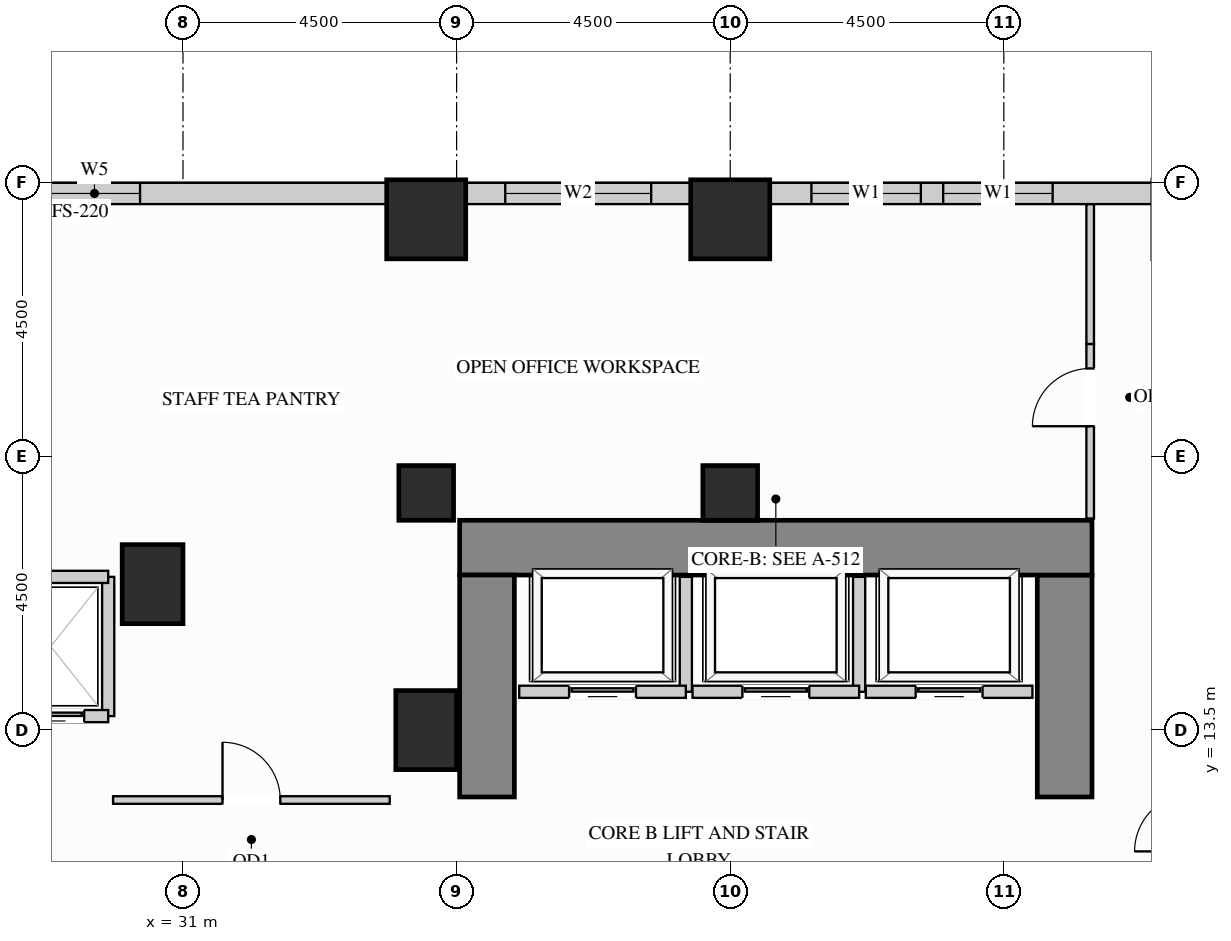
"""IFC4 building model, lengths in metres.
Left out: names, types, materials, properties, quantities, classifications, styles, units other than length and angle.
Written with IfcOpenShell. Run it as: python <this file> out.ifc"""

import sys

from ifc_helpers import new_model, si_unit, direction, frame, frame_2d, origin, origin_2d, place, context, subcontext, project, spatial, rectangle, extrude, source, transform, mapped, element, fill, save


model = new_model("IFC4")
c1 = context("Model", 3, precision=1e-05, world=origin(), true_north=direction((0.0, 1.0)))
c2 = subcontext(c1, "Body", "Model", "MODEL_VIEW")
j1 = project(units=[si_unit("LENGTHUNIT", "METRE"), si_unit("PLANEANGLEUNIT", "RADIAN")], contexts=[c1])
p1 = place(None, origin())
s1 = spatial("IfcSite", under=j1, at=p1, CompositionType="ELEMENT")
p2 = place(p1, origin())
s2 = spatial("IfcBuilding", under=s1, at=p2, CompositionType="ELEMENT")
p3 = place(p2, frame((0.0, 0.0, 22.5)))
s3 = spatial("IfcBuildingStorey", under=s2, at=p3, CompositionType="ELEMENT", Elevation=22.5)
m1 = source(origin(), c2, "Body", "SweptSolid", [
    extrude(rectangle(XDim=0.9, YDim=0.9, at=origin_2d()), origin(), (0.0, 0.0, 1.0), 3.38),
])
for number, where, z_axis, x_axis in (
    (1, (35.0, 17.4, 0.0), (0.0, 0.0, 1.0), (1.0, 0.0, 0.0)),
    (2, (40.0, 17.4, 0.0), (0.0, 0.0, 1.0), (1.0, 0.0, 0.0)),
):
    element("IfcColumn", number, at=place(p3, frame(where, z_axis=z_axis, x_axis=x_axis)), inside=s3, PredefinedType="COLUMN", context=c2, shape_type="MappedRepresentation", body=[
        mapped(m1, transform((0.0, 0.0, 0.0), x_axis=(1.0, 0.0, 0.0), y_axis=(0.0, 1.0, 0.0), z_axis=(0.0, 0.0, 1.0))),
    ])
m2 = source(origin(), c2, "Body", "SweptSolid", [
    extrude(rectangle(XDim=1.0, YDim=1.3, at=origin_2d()), origin(), (0.0, 0.0, 1.0), 3.38),
])
for number, where, z_axis, x_axis in (
    (3, (35.0, 13.5, 0.0), (0.0, 0.0, 1.0), (1.0, 0.0, 0.0)),
    (4, (30.5, 15.9, 0.0), (0.0, 0.0, 1.0), (1.0, 0.0, 0.0)),
):
    element("IfcColumn", number, at=place(p3, frame(where, z_axis=z_axis, x_axis=x_axis)), inside=s3, PredefinedType="COLUMN", context=c2, shape_type="MappedRepresentation", body=[
        mapped(m2, transform((0.0, 0.0, 0.0), x_axis=(1.0, 0.0, 0.0), y_axis=(0.0, 1.0, 0.0), z_axis=(0.0, 0.0, 1.0))),
    ])
m3 = source(origin(), c2, "Body", "SweptSolid", [
    extrude(rectangle(XDim=1.3, YDim=1.3, at=origin_2d()), origin(), (0.0, 0.0, 1.0), 3.38),
])
for number, where, z_axis, x_axis in (
    (5, (35.0, 21.9, 0.0), (0.0, 0.0, 1.0), (1.0, 0.0, 0.0)),
    (6, (40.0, 21.9, 0.0), (0.0, 0.0, 1.0), (1.0, 0.0, 0.0)),
):
    element("IfcColumn", number, at=place(p3, frame(where, z_axis=z_axis, x_axis=x_axis)), inside=s3, PredefinedType="COLUMN", context=c2, shape_type="MappedRepresentation", body=[
        mapped(m3, transform((0.0, 0.0, 0.0), x_axis=(1.0, 0.0, 0.0), y_axis=(0.0, 1.0, 0.0), z_axis=(0.0, 0.0, 1.0))),
    ])
m4 = source(origin(), c2, "Body", "SweptSolid", [
    extrude(rectangle(XDim=3.65, YDim=0.9, at=frame_2d((1.825, 0.0))), origin(), (0.0, 0.0, 1.0), 3.38),
])
p4 = place(p3, frame((45.5, 12.4, 0.0), z_axis=(0.0, 0.0, 1.0), x_axis=(0.0, 1.0, 0.0)))
e7 = element("IfcWall", 7, at=p4, inside=s3, PredefinedType="SHEAR", context=c2, shape_type="MappedRepresentation", body=[
    mapped(m4, transform((0.0, 0.0, 0.0), x_axis=(1.0, 0.0, 0.0), y_axis=(0.0, 1.0, 0.0), z_axis=(0.0, 0.0, 1.0))),
])
m5 = source(origin(), c2, "Body", "SweptSolid", [
    extrude(rectangle(XDim=10.4, YDim=0.9, at=frame_2d((5.2, 0.0))), origin(), (0.0, 0.0, 1.0), 3.38),
])
p5 = place(p3, frame((35.55, 16.5, 0.0), z_axis=(0.0, 0.0, 1.0), x_axis=(1.0, 0.0, 0.0)))
e8 = element("IfcWall", 8, at=p5, inside=s3, PredefinedType="SHEAR", context=c2, shape_type="MappedRepresentation", body=[
    mapped(m5, transform((0.0, 0.0, 0.0), x_axis=(1.0, 0.0, 0.0), y_axis=(0.0, 1.0, 0.0), z_axis=(0.0, 0.0, 1.0))),
])
p6 = place(p3, frame((36.0, 12.4, 0.0), z_axis=(0.0, 0.0, 1.0), x_axis=(0.0, 1.0, 0.0)))
e9 = element("IfcWall", 9, at=p6, inside=s3, PredefinedType="SHEAR", context=c2, shape_type="MappedRepresentation", body=[
    mapped(m4, transform((0.0, 0.0, 0.0), x_axis=(1.0, 0.0, 0.0), y_axis=(0.0, 1.0, 0.0), z_axis=(0.0, 0.0, 1.0))),
])
p7 = place(p3, frame((46.952, 22.325, 0.0), z_axis=(0.0, 0.0, 1.0), x_axis=(-1.0, 0.0, 0.0)))
e10 = element("IfcWall", 10, at=p7, inside=s3, PredefinedType="SOLIDWALL", context=c2, shape_type="SweptSolid", body=[
    extrude(rectangle(XDim=6.304, YDim=0.35, at=frame_2d((3.152, 0.0))), origin(), (0.0, 0.0, 1.0), 2.51),
])
p8 = place(p7, frame((1.649, 0.0, 0.78)))
e11 = element("IfcOpeningElement", 11, at=p8, cuts=e10, PredefinedType="OPENING", context=c2, shape_type="SweptSolid", body=[
    extrude(rectangle(XDim=1.8, YDim=1.55, at=frame_2d((0.9, 0.775))), frame((0.0, 0.185, 0.0), z_axis=(0.0, -1.0, 0.0), x_axis=(1.0, 0.0, 0.0)), (0.0, 0.0, 1.0), 0.37),
])
p9 = place(p7, frame((3.817, 0.0, 0.78)))
e12 = element("IfcOpeningElement", 12, at=p9, cuts=e10, PredefinedType="OPENING", context=c2, shape_type="SweptSolid", body=[
    extrude(rectangle(XDim=1.8, YDim=1.55, at=frame_2d((0.9, 0.775))), frame((0.0, 0.185, 0.0), z_axis=(0.0, -1.0, 0.0), x_axis=(1.0, 0.0, 0.0)), (0.0, 0.0, 1.0), 0.37),
])
p10 = place(p3, frame((39.352, 22.325, 0.0), z_axis=(0.0, 0.0, 1.0), x_axis=(-1.0, 0.0, 0.0)))
e13 = element("IfcWall", 13, at=p10, inside=s3, PredefinedType="SOLIDWALL", context=c2, shape_type="SweptSolid", body=[
    extrude(rectangle(XDim=3.704, YDim=0.35, at=frame_2d((1.852, 0.0))), origin(), (0.0, 0.0, 1.0), 2.51),
])
p11 = place(p10, frame((0.652, 0.0, 0.78)))
e14 = element("IfcOpeningElement", 14, at=p11, cuts=e13, PredefinedType="OPENING", context=c2, shape_type="SweptSolid", body=[
    extrude(rectangle(XDim=2.4, YDim=1.55, at=frame_2d((1.2, 0.775))), frame((0.0, 0.185, 0.0), z_axis=(0.0, -1.0, 0.0), x_axis=(1.0, 0.0, 0.0)), (0.0, 0.0, 1.0), 0.37),
])
p12 = place(p3, frame((34.352, 22.325, 0.0), z_axis=(0.0, 0.0, 1.0), x_axis=(-1.0, 0.0, 0.0)))
e15 = element("IfcWall", 15, at=p12, inside=s3, PredefinedType="SOLIDWALL", context=c2, shape_type="SweptSolid", body=[
    extrude(rectangle(XDim=14.854, YDim=0.35, at=frame_2d((7.427, 0.0))), origin(), (0.0, 0.0, 1.0), 3.365),
])
p13 = place(p12, frame((4.058, 0.0, 0.78)))
e16 = element("IfcOpeningElement", 16, at=p13, cuts=e15, PredefinedType="OPENING", context=c2, shape_type="SweptSolid", body=[
    extrude(rectangle(XDim=1.5, YDim=2.0, at=frame_2d((0.75, 1.0))), frame((0.0, 0.185, 0.0), z_axis=(0.0, -1.0, 0.0), x_axis=(1.0, 0.0, 0.0)), (0.0, 0.0, 1.0), 0.37),
])
p14 = place(p12, frame((9.296, 0.0, 0.78)))
e17 = element("IfcOpeningElement", 17, at=p14, cuts=e15, PredefinedType="OPENING", context=c2, shape_type="SweptSolid", body=[
    extrude(rectangle(XDim=1.5, YDim=2.0, at=frame_2d((0.75, 1.0))), frame((0.0, 0.185, 0.0), z_axis=(0.0, -1.0, 0.0), x_axis=(1.0, 0.0, 0.0)), (0.0, 0.0, 1.0), 0.37),
])
p15 = place(p3, frame((45.92, 16.98, 0.0), z_axis=(0.0, 0.0, 1.0), x_axis=(0.0, 1.0, 0.0)))
e18 = element("IfcWall", 18, at=p15, inside=s3, PredefinedType="PARTITIONING", context=c2, shape_type="SweptSolid", body=[
    extrude(rectangle(XDim=2.87, YDim=0.125, at=frame_2d((1.435, 0.0))), origin(), (0.0, 0.0, 1.0), 3.365),
])
p16 = place(p15, frame((1.517, 0.0, 0.0)))
e19 = element("IfcOpeningElement", 19, at=p16, cuts=e18, PredefinedType="OPENING", context=c2, shape_type="SweptSolid", body=[
    extrude(rectangle(XDim=0.95, YDim=2.15, at=frame_2d((0.475, 1.075))), frame((0.0, 0.073, 0.0), z_axis=(0.0, -1.0, 0.0), x_axis=(1.0, 0.0, 0.0)), (0.0, 0.0, 1.0), 0.145),
])
m6 = source(origin(), c2, "Body", "SweptSolid", [
    extrude(rectangle(XDim=2.298, YDim=0.125, at=frame_2d((1.149, 0.0))), origin(), (0.0, 0.0, 1.0), 3.365),
])
p17 = place(p3, frame((45.92, 19.85, 0.0), z_axis=(0.0, 0.0, 1.0), x_axis=(0.0, 1.0, 0.0)))
e20 = element("IfcWall", 20, at=p17, inside=s3, PredefinedType="PARTITIONING", context=c2, shape_type="MappedRepresentation", body=[
    mapped(m6, transform((0.0, 0.0, 0.0), x_axis=(1.0, 0.0, 0.0), y_axis=(0.0, 1.0, 0.0), z_axis=(0.0, 0.0, 1.0))),
])
p18 = place(p3, frame((29.85, 12.35, 0.0), z_axis=(0.0, 0.0, 1.0), x_axis=(1.0, 0.0, 0.0)))
e21 = element("IfcWall", 21, at=p18, inside=s3, PredefinedType="PARTITIONING", context=c2, shape_type="SweptSolid", body=[
    extrude(rectangle(XDim=4.55, YDim=0.125, at=frame_2d((2.275, 0.0))), origin(), (0.0, 0.0, 1.0), 3.365),
])
p19 = place(p18, frame((1.8, 0.0, 0.0)))
e22 = element("IfcOpeningElement", 22, at=p19, cuts=e21, PredefinedType="OPENING", context=c2, shape_type="SweptSolid", body=[
    extrude(rectangle(XDim=0.95, YDim=2.15, at=frame_2d((0.475, 1.075))), frame((0.0, 0.073, 0.0), z_axis=(0.0, -1.0, 0.0), x_axis=(1.0, 0.0, 0.0)), (0.0, 0.0, 1.0), 0.145),
])
m7 = source(origin(), c2, "Body", "SweptSolid", [
    extrude(rectangle(XDim=1.89, YDim=0.2, at=frame_2d((0.945, 0.0))), origin(), (0.0, 0.0, 1.0), 3.365),
])
p20 = place(p3, frame((39.27, 14.13, 0.0), z_axis=(0.0, 0.0, 1.0), x_axis=(0.0, 1.0, 0.0)))
e23 = element("IfcWall", 23, at=p20, inside=s3, PredefinedType="PARTITIONING", context=c2, shape_type="MappedRepresentation", body=[
    mapped(m7, transform((0.0, 0.0, 0.0), x_axis=(1.0, 0.0, 0.0), y_axis=(0.0, 1.0, 0.0), z_axis=(0.0, 0.0, 1.0))),
])
p21 = place(p3, frame((36.53, 14.13, 0.0), z_axis=(0.0, 0.0, 1.0), x_axis=(1.0, 0.0, 0.0)))
e24 = element("IfcWall", 24, at=p21, inside=s3, PredefinedType="PARTITIONING", context=c2, shape_type="SweptSolid", body=[
    extrude(rectangle(XDim=2.74, YDim=0.2, at=frame_2d((1.37, 0.0))), origin(), (0.0, 0.0, 1.0), 3.365),
])
p22 = place(p21, frame((0.82, 0.0, 0.0)))
e25 = element("IfcOpeningElement", 25, at=p22, cuts=e24, PredefinedType="OPENING", context=c2, shape_type="SweptSolid", body=[
    extrude(rectangle(XDim=1.1, YDim=2.2, at=frame_2d((0.55, 1.1))), frame((0.0, 0.11, 0.0), z_axis=(0.0, -1.0, 0.0), x_axis=(1.0, 0.0, 0.0)), (0.0, 0.0, 1.0), 0.22),
])
p23 = place(p3, frame((42.12, 14.13, 0.0), z_axis=(0.0, 0.0, 1.0), x_axis=(0.0, 1.0, 0.0)))
e26 = element("IfcWall", 26, at=p23, inside=s3, PredefinedType="PARTITIONING", context=c2, shape_type="MappedRepresentation", body=[
    mapped(m7, transform((0.0, 0.0, 0.0), x_axis=(1.0, 0.0, 0.0), y_axis=(0.0, 1.0, 0.0), z_axis=(0.0, 0.0, 1.0))),
])
p24 = place(p3, frame((39.38, 14.13, 0.0), z_axis=(0.0, 0.0, 1.0), x_axis=(1.0, 0.0, 0.0)))
e27 = element("IfcWall", 27, at=p24, inside=s3, PredefinedType="PARTITIONING", context=c2, shape_type="SweptSolid", body=[
    extrude(rectangle(XDim=2.74, YDim=0.2, at=frame_2d((1.37, 0.0))), origin(), (0.0, 0.0, 1.0), 3.365),
])
p25 = place(p24, frame((0.82, 0.0, 0.0)))
e28 = element("IfcOpeningElement", 28, at=p25, cuts=e27, PredefinedType="OPENING", context=c2, shape_type="SweptSolid", body=[
    extrude(rectangle(XDim=1.1, YDim=2.2, at=frame_2d((0.55, 1.1))), frame((0.0, 0.11, 0.0), z_axis=(0.0, -1.0, 0.0), x_axis=(1.0, 0.0, 0.0)), (0.0, 0.0, 1.0), 0.22),
])
p26 = place(p3, frame((42.23, 14.13, 0.0), z_axis=(0.0, 0.0, 1.0), x_axis=(1.0, 0.0, 0.0)))
e29 = element("IfcWall", 29, at=p26, inside=s3, PredefinedType="PARTITIONING", context=c2, shape_type="SweptSolid", body=[
    extrude(rectangle(XDim=2.74, YDim=0.2, at=frame_2d((1.37, 0.0))), origin(), (0.0, 0.0, 1.0), 3.365),
])
p27 = place(p26, frame((0.82, 0.0, 0.0)))
e30 = element("IfcOpeningElement", 30, at=p27, cuts=e29, PredefinedType="OPENING", context=c2, shape_type="SweptSolid", body=[
    extrude(rectangle(XDim=1.1, YDim=2.2, at=frame_2d((0.55, 1.1))), frame((0.0, 0.11, 0.0), z_axis=(0.0, -1.0, 0.0), x_axis=(1.0, 0.0, 0.0)), (0.0, 0.0, 1.0), 0.22),
])
m8 = source(origin(), c2, "Body", "SweptSolid", [
    extrude(rectangle(XDim=2.29, YDim=0.2, at=frame_2d((1.145, 0.0))), origin(), (0.0, 0.0, 1.0), 3.365),
])
p28 = place(p3, frame((29.77, 13.73, 0.0), z_axis=(0.0, 0.0, 1.0), x_axis=(0.0, 1.0, 0.0)))
e31 = element("IfcWall", 31, at=p28, inside=s3, PredefinedType="PARTITIONING", context=c2, shape_type="MappedRepresentation", body=[
    mapped(m8, transform((0.0, 0.0, 0.0), x_axis=(1.0, 0.0, 0.0), y_axis=(0.0, 1.0, 0.0), z_axis=(0.0, 0.0, 1.0))),
])
m9 = source(origin(), c2, "Body", "SweptSolid", [
    extrude(rectangle(XDim=1.89, YDim=0.2, at=frame_2d((0.945, 0.0))), origin(), (0.0, 0.0, 1.0), 2.67),
])
p29 = place(p3, frame((27.88, 16.02, 0.0), z_axis=(0.0, 0.0, 1.0), x_axis=(1.0, 0.0, 0.0)))
e32 = element("IfcWall", 32, at=p29, inside=s3, PredefinedType="PARTITIONING", context=c2, shape_type="MappedRepresentation", body=[
    mapped(m9, transform((0.0, 0.0, 0.0), x_axis=(1.0, 0.0, 0.0), y_axis=(0.0, 1.0, 0.0), z_axis=(0.0, 0.0, 1.0))),
])
p30 = place(p3, frame((27.88, 13.73, 0.0), z_axis=(0.0, 0.0, 1.0), x_axis=(1.0, 0.0, 0.0)))
e33 = element("IfcWall", 33, at=p30, inside=s3, PredefinedType="PARTITIONING", context=c2, shape_type="SweptSolid", body=[
    extrude(rectangle(XDim=1.89, YDim=0.2, at=frame_2d((0.945, 0.0))), origin(), (0.0, 0.0, 1.0), 2.446),
])
p31 = place(p30, frame((0.395, 0.0, 0.0)))
e34 = element("IfcOpeningElement", 34, at=p31, cuts=e33, PredefinedType="OPENING", context=c2, shape_type="SweptSolid", body=[
    extrude(rectangle(XDim=1.1, YDim=2.2, at=frame_2d((0.55, 1.1))), frame((0.0, 0.11, 0.0), z_axis=(0.0, -1.0, 0.0), x_axis=(1.0, 0.0, 0.0)), (0.0, 0.0, 1.0), 0.22),
])
m10 = source(origin(), c2, "Body", "SweptSolid", [
    extrude(rectangle(XDim=1.1, YDim=2.2, at=frame_2d((0.55, 1.1))), frame((0.0, 0.025, 0.0), z_axis=(0.0, -1.0, 0.0), x_axis=(1.0, 0.0, 0.0)), (0.0, 0.0, 1.0), 0.05),
])
p32 = place(p22, origin())
e35 = element("IfcDoor", 35, at=p32, inside=s3, OperationType="SLIDING_TO_LEFT", PredefinedType="DOOR", context=c2, shape_type="MappedRepresentation", body=[
    mapped(m10, transform((0.0, 0.0, 0.0), x_axis=(1.0, 0.0, 0.0), y_axis=(0.0, 1.0, 0.0), z_axis=(0.0, 0.0, 1.0))),
])
fill(e25, e35)
p33 = place(p25, origin())
e36 = element("IfcDoor", 36, at=p33, inside=s3, OperationType="SLIDING_TO_LEFT", PredefinedType="DOOR", context=c2, shape_type="MappedRepresentation", body=[
    mapped(m10, transform((0.0, 0.0, 0.0), x_axis=(1.0, 0.0, 0.0), y_axis=(0.0, 1.0, 0.0), z_axis=(0.0, 0.0, 1.0))),
])
fill(e28, e36)
p34 = place(p27, origin())
e37 = element("IfcDoor", 37, at=p34, inside=s3, OperationType="SLIDING_TO_LEFT", PredefinedType="DOOR", context=c2, shape_type="MappedRepresentation", body=[
    mapped(m10, transform((0.0, 0.0, 0.0), x_axis=(1.0, 0.0, 0.0), y_axis=(0.0, 1.0, 0.0), z_axis=(0.0, 0.0, 1.0))),
])
fill(e30, e37)
p35 = place(p31, origin())
e38 = element("IfcDoor", 38, at=p35, inside=s3, OperationType="SLIDING_TO_LEFT", PredefinedType="DOOR", context=c2, shape_type="MappedRepresentation", body=[
    mapped(m10, transform((0.0, 0.0, 0.0), x_axis=(1.0, 0.0, 0.0), y_axis=(0.0, 1.0, 0.0), z_axis=(0.0, 0.0, 1.0))),
])
fill(e34, e38)
m11 = source(origin(), c2, "Body", "SweptSolid", [
    extrude(rectangle(XDim=0.95, YDim=2.15, at=frame_2d((0.475, 1.075))), frame((0.0, 0.025, 0.0), z_axis=(0.0, -1.0, 0.0), x_axis=(1.0, 0.0, 0.0)), (0.0, 0.0, 1.0), 0.05),
])
p36 = place(p16, origin())
e39 = element("IfcDoor", 39, at=p36, inside=s3, OperationType="SINGLE_SWING_LEFT", PredefinedType="DOOR", context=c2, shape_type="MappedRepresentation", body=[
    mapped(m11, transform((0.0, 0.0, 0.0), x_axis=(1.0, 0.0, 0.0), y_axis=(0.0, 1.0, 0.0), z_axis=(0.0, 0.0, 1.0))),
])
fill(e19, e39)
p37 = place(p19, origin())
e40 = element("IfcDoor", 40, at=p37, inside=s3, OperationType="SINGLE_SWING_LEFT", PredefinedType="DOOR", context=c2, shape_type="MappedRepresentation", body=[
    mapped(m11, transform((0.0, 0.0, 0.0), x_axis=(1.0, 0.0, 0.0), y_axis=(0.0, 1.0, 0.0), z_axis=(0.0, 0.0, 1.0))),
])
fill(e22, e40)
m12 = source(origin(), c2, "Body", "SweptSolid", [
    extrude(rectangle(XDim=1.8, YDim=1.55, at=frame_2d((0.9, 0.775))), frame((0.0, 0.03, 0.0), z_axis=(0.0, -1.0, 0.0), x_axis=(1.0, 0.0, 0.0)), (0.0, 0.0, 1.0), 0.06),
])
p38 = place(p8, origin())
e41 = element("IfcWindow", 41, at=p38, inside=s3, PartitioningType="SINGLE_PANEL", PredefinedType="WINDOW", context=c2, shape_type="MappedRepresentation", body=[
    mapped(m12, transform((0.0, 0.0, 0.0), x_axis=(1.0, 0.0, 0.0), y_axis=(0.0, 1.0, 0.0), z_axis=(0.0, 0.0, 1.0))),
])
fill(e11, e41)
p39 = place(p9, origin())
e42 = element("IfcWindow", 42, at=p39, inside=s3, PartitioningType="SINGLE_PANEL", PredefinedType="WINDOW", context=c2, shape_type="MappedRepresentation", body=[
    mapped(m12, transform((0.0, 0.0, 0.0), x_axis=(1.0, 0.0, 0.0), y_axis=(0.0, 1.0, 0.0), z_axis=(0.0, 0.0, 1.0))),
])
fill(e12, e42)
m13 = source(origin(), c2, "Body", "SweptSolid", [
    extrude(rectangle(XDim=2.4, YDim=1.55, at=frame_2d((1.2, 0.775))), frame((0.0, 0.03, 0.0), z_axis=(0.0, -1.0, 0.0), x_axis=(1.0, 0.0, 0.0)), (0.0, 0.0, 1.0), 0.06),
])
p40 = place(p11, origin())
e43 = element("IfcWindow", 43, at=p40, inside=s3, PartitioningType="SINGLE_PANEL", PredefinedType="WINDOW", context=c2, shape_type="MappedRepresentation", body=[
    mapped(m13, transform((0.0, 0.0, 0.0), x_axis=(1.0, 0.0, 0.0), y_axis=(0.0, 1.0, 0.0), z_axis=(0.0, 0.0, 1.0))),
])
fill(e14, e43)
m14 = source(origin(), c2, "Body", "SweptSolid", [
    extrude(rectangle(XDim=1.5, YDim=2.0, at=frame_2d((0.75, 1.0))), frame((0.0, 0.03, 0.0), z_axis=(0.0, -1.0, 0.0), x_axis=(1.0, 0.0, 0.0)), (0.0, 0.0, 1.0), 0.06),
])
p41 = place(p13, origin())
e44 = element("IfcWindow", 44, at=p41, inside=s3, PartitioningType="SINGLE_PANEL", PredefinedType="WINDOW", context=c2, shape_type="MappedRepresentation", body=[
    mapped(m14, transform((0.0, 0.0, 0.0), x_axis=(1.0, 0.0, 0.0), y_axis=(0.0, 1.0, 0.0), z_axis=(0.0, 0.0, 1.0))),
])
fill(e16, e44)
save(model, sys.argv[1])
